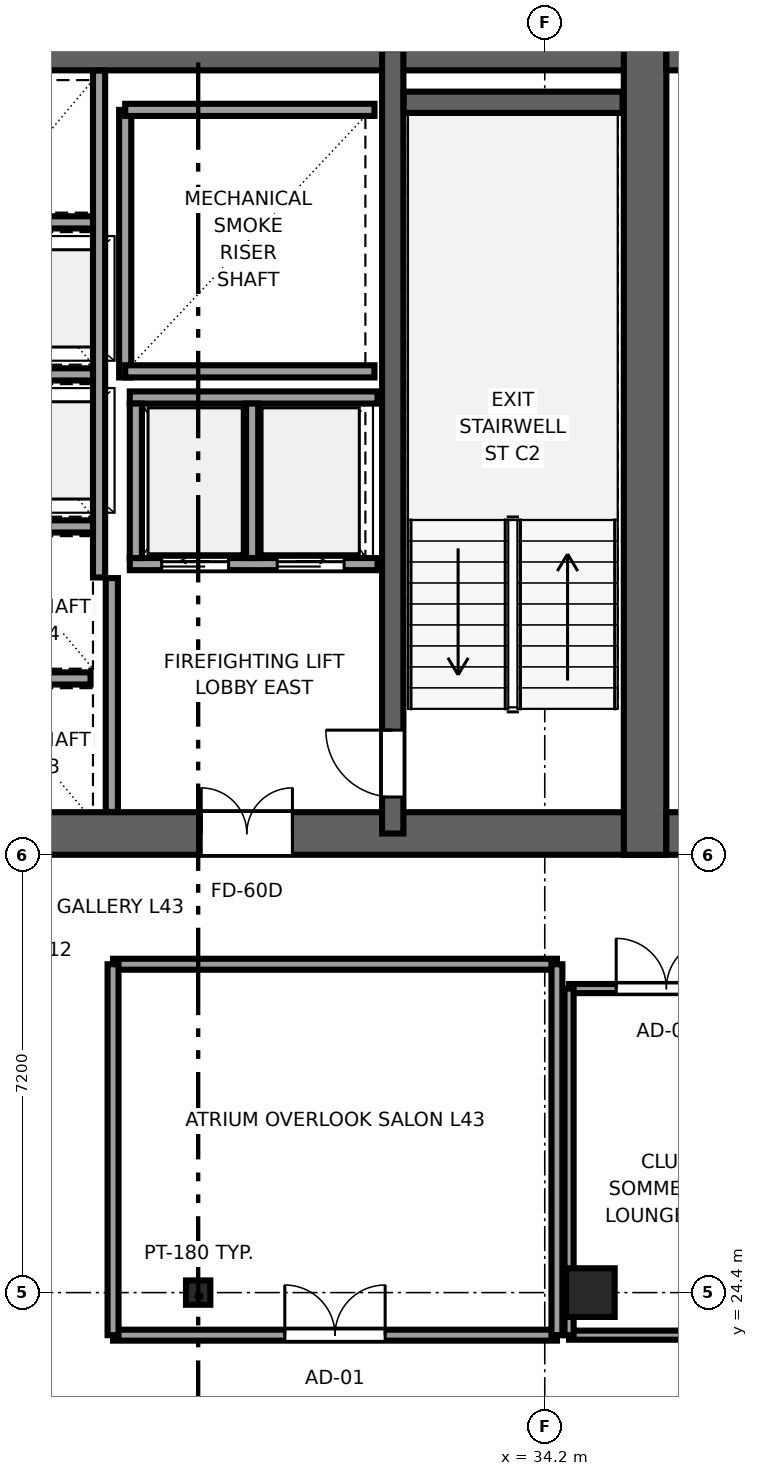
"""IFC4 building model, lengths in metres.
Left out: names, types, materials, properties, quantities, classifications, styles, units other than length and angle.
Written with IfcOpenShell. Run it as: python <this file> out.ifc"""

import sys

from ifc_helpers import new_model, si_unit, direction, frame, frame_2d, origin, origin_2d, place, context, subcontext, project, spatial, rectangle, i_section, extrude, source, transform, mapped, element, fill, save


model = new_model("IFC4")
c1 = context("Model", 3, precision=1e-05, world=origin(), true_north=direction((0.0, 1.0)))
c2 = subcontext(c1, "Body", "Model", "MODEL_VIEW")
j1 = project(units=[si_unit("LENGTHUNIT", "METRE"), si_unit("PLANEANGLEUNIT", "RADIAN")], contexts=[c1])
p1 = place(None, origin())
s1 = spatial("IfcSite", under=j1, at=p1, CompositionType="ELEMENT")
p2 = place(p1, origin())
s2 = spatial("IfcBuilding", under=s1, at=p2, CompositionType="ELEMENT")
p3 = place(p2, frame((0.0, 0.0, 164.8)))
s3 = spatial("IfcBuildingStorey", under=s2, at=p3, CompositionType="ELEMENT", Elevation=164.8)
p4 = place(p3, frame((9.8, 31.95, 0.0), z_axis=(0.0, 0.0, 1.0), x_axis=(1.0, 0.0, 0.0)))
e1 = element("IfcWall", 1, at=p4, inside=s3, PredefinedType="SHEAR", context=c2, shape_type="SweptSolid", body=[
    extrude(rectangle(XDim=26.4, YDim=0.7, at=frame_2d((13.2, 0.0))), origin(), (0.0, 0.0, 1.0), 3.55),
])
p5 = place(p4, frame((6.32, 0.0, 0.0), z_axis=(0.0, 0.0, 1.0), x_axis=(-1.0, 0.0, 0.0)))
e2 = element("IfcOpeningElement", 2, at=p5, cuts=e1, PredefinedType="OPENING", context=c2, shape_type="SweptSolid", body=[
    extrude(rectangle(XDim=1.5, YDim=2.04, at=frame_2d((0.75, 1.02))), frame((0.0, 0.36, 0.0), z_axis=(0.0, -1.0, 0.0), x_axis=(1.0, 0.0, 0.0)), (0.0, 0.0, 1.0), 0.72),
])
p6 = place(p4, frame((13.95, 0.0, 0.0), z_axis=(0.0, 0.0, 1.0), x_axis=(-1.0, 0.0, 0.0)))
e3 = element("IfcOpeningElement", 3, at=p6, cuts=e1, PredefinedType="OPENING", context=c2, shape_type="SweptSolid", body=[
    extrude(rectangle(XDim=1.5, YDim=2.04, at=frame_2d((0.75, 1.02))), frame((0.0, 0.36, 0.0), z_axis=(0.0, -1.0, 0.0), x_axis=(1.0, 0.0, 0.0)), (0.0, 0.0, 1.0), 0.72),
])
p7 = place(p4, frame((20.25, 0.0, 0.0), z_axis=(0.0, 0.0, 1.0), x_axis=(-1.0, 0.0, 0.0)))
e4 = element("IfcOpeningElement", 4, at=p7, cuts=e1, PredefinedType="OPENING", context=c2, shape_type="SweptSolid", body=[
    extrude(rectangle(XDim=1.5, YDim=2.04, at=frame_2d((0.75, 1.02))), frame((0.0, 0.36, 0.0), z_axis=(0.0, -1.0, 0.0), x_axis=(1.0, 0.0, 0.0)), (0.0, 0.0, 1.0), 0.72),
])
p8 = place(p4, frame((8.37, 0.0, 0.0), z_axis=(0.0, 0.0, 1.0), x_axis=(-1.0, 0.0, 0.0)))
e5 = element("IfcOpeningElement", 5, at=p8, cuts=e1, PredefinedType="OPENING", context=c2, shape_type="SweptSolid", body=[
    extrude(rectangle(XDim=0.82, YDim=2.01, at=frame_2d((0.41, 1.005))), frame((0.0, 0.36, 0.0), z_axis=(0.0, -1.0, 0.0), x_axis=(1.0, 0.0, 0.0)), (0.0, 0.0, 1.0), 0.72),
])
p9 = place(p3, frame((9.8, 44.85, 0.0), z_axis=(0.0, 0.0, 1.0), x_axis=(1.0, 0.0, 0.0)))
e6 = element("IfcWall", 6, at=p9, inside=s3, PredefinedType="SHEAR", context=c2, shape_type="SweptSolid", body=[
    extrude(rectangle(XDim=26.4, YDim=0.7, at=frame_2d((13.2, 0.0))), origin(), (0.0, 0.0, 1.0), 3.55),
])
p10 = place(p3, frame((35.85, 31.6, 0.0), z_axis=(0.0, 0.0, 1.0), x_axis=(0.0, 1.0, 0.0)))
e7 = element("IfcWall", 7, at=p10, inside=s3, PredefinedType="SHEAR", context=c2, shape_type="SweptSolid", body=[
    extrude(rectangle(XDim=13.6, YDim=0.7, at=frame_2d((6.8, 0.0))), origin(), (0.0, 0.0, 1.0), 3.55),
])
p11 = place(p3, frame((31.7, 31.95, 0.0), z_axis=(0.0, 0.0, 1.0), x_axis=(0.0, 1.0, 0.0)))
e8 = element("IfcWall", 8, at=p11, inside=s3, PredefinedType="SHEAR", context=c2, shape_type="SweptSolid", body=[
    extrude(rectangle(XDim=12.9, YDim=0.35, at=frame_2d((6.45, 0.0))), origin(), (0.0, 0.0, 1.0), 3.55),
])
p12 = place(p11, frame((1.7, 0.0, 0.0), z_axis=(0.0, 0.0, 1.0), x_axis=(-1.0, 0.0, 0.0)))
e9 = element("IfcOpeningElement", 9, at=p12, cuts=e8, PredefinedType="OPENING", context=c2, shape_type="SweptSolid", body=[
    extrude(rectangle(XDim=1.1, YDim=2.12, at=frame_2d((0.55, 1.06))), frame((0.0, 0.185, 0.0), z_axis=(0.0, -1.0, 0.0), x_axis=(1.0, 0.0, 0.0)), (0.0, 0.0, 1.0), 0.37),
])
p13 = place(p3, frame((36.2, 31.95, 0.0), z_axis=(0.0, 0.0, 1.0), x_axis=(1.0, 0.0, 0.0)))
e10 = element("IfcWall", 10, at=p13, inside=s3, PredefinedType="SHEAR", context=c2, shape_type="SweptSolid", body=[
    extrude(rectangle(XDim=4.2, YDim=0.7, at=frame_2d((2.1, 0.0))), origin(), (0.0, 0.0, 1.0), 3.55),
])
p14 = place(p13, frame((1.34, 0.0, 0.0), z_axis=(0.0, 0.0, 1.0), x_axis=(-1.0, 0.0, 0.0)))
e11 = element("IfcOpeningElement", 11, at=p14, cuts=e10, PredefinedType="OPENING", context=c2, shape_type="SweptSolid", body=[
    extrude(rectangle(XDim=1.02, YDim=2.03, at=frame_2d((0.51, 1.015))), frame((0.0, 0.36, 0.0), z_axis=(0.0, -1.0, 0.0), x_axis=(1.0, 0.0, 0.0)), (0.0, 0.0, 1.0), 0.72),
])
p15 = place(p3, frame((36.2, 44.85, 0.0), z_axis=(0.0, 0.0, 1.0), x_axis=(1.0, 0.0, 0.0)))
e12 = element("IfcWall", 12, at=p15, inside=s3, PredefinedType="SHEAR", context=c2, shape_type="SweptSolid", body=[
    extrude(rectangle(XDim=4.2, YDim=0.7, at=frame_2d((2.1, 0.0))), origin(), (0.0, 0.0, 1.0), 3.55),
])
p16 = place(p3, frame((31.88, 43.975, 0.0), z_axis=(0.0, 0.0, 1.0), x_axis=(1.0, 0.0, 0.0)))
e13 = element("IfcWall", 13, at=p16, inside=s3, PredefinedType="SHEAR", context=c2, shape_type="SweptSolid", body=[
    extrude(rectangle(XDim=3.6, YDim=0.35, at=frame_2d((1.8, 0.0))), origin(), (0.0, 0.0, 1.0), 3.55),
])
m1 = source(origin(), c2, "Body", "SweptSolid", [
    extrude(rectangle(XDim=0.8, YDim=0.8, at=origin_2d()), origin(), (0.0, 0.0, 1.0), 3.55),
])
p17 = place(p3, frame((34.95, 24.4, 0.0), z_axis=(0.0, 0.0, 1.0), x_axis=(1.0, 0.0, 0.0)))
e14 = element("IfcColumn", 14, at=p17, inside=s3, PredefinedType="COLUMN", context=c2, shape_type="MappedRepresentation", body=[
    mapped(m1, transform((0.0, 0.0, 0.0), x_axis=(1.0, 0.0, 0.0), y_axis=(0.0, 1.0, 0.0), z_axis=(0.0, 0.0, 1.0), scale=1.0)),
])
m2 = source(origin(), c2, "Body", "SweptSolid", [
    extrude(i_section(OverallWidth=0.4, OverallDepth=0.4, WebThickness=0.02, FlangeThickness=0.035, at=origin_2d()), origin(), (0.0, 0.0, 1.0), 3.55),
])
p18 = place(p3, frame((28.5, 24.4, 0.0), z_axis=(0.0, 0.0, 1.0), x_axis=(1.0, 0.0, 0.0)))
e15 = element("IfcColumn", 15, at=p18, inside=s3, PredefinedType="COLUMN", context=c2, shape_type="MappedRepresentation", body=[
    mapped(m2, transform((0.0, 0.0, 0.0), x_axis=(1.0, 0.0, 0.0), y_axis=(0.0, 1.0, 0.0), z_axis=(0.0, 0.0, 1.0), scale=1.0)),
])
p19 = place(p3, frame((27.3, 39.45, 0.0), z_axis=(0.0, 0.0, 1.0), x_axis=(0.0, 1.0, 0.0)))
e16 = element("IfcWall", 16, at=p19, inside=s3, PredefinedType="SOLIDWALL", context=c2, shape_type="SweptSolid", body=[
    extrude(rectangle(XDim=4.4, YDim=0.2, at=frame_2d((2.2, 0.0))), origin(), (0.0, 0.0, 1.0), 3.37),
])
for number, where, z_axis, x_axis in (
    (17, (27.3, 39.55, 0.0), (0.0, 0.0, 1.0), (1.0, 0.0, 0.0)),
    (18, (27.3, 43.85, 0.0), (0.0, 0.0, 1.0), (1.0, 0.0, 0.0)),
):
    element("IfcWall", number, at=place(p3, frame(where, z_axis=z_axis, x_axis=x_axis)), inside=s3, PredefinedType="SOLIDWALL", context=c2, shape_type="SweptSolid", body=[
        extrude(rectangle(XDim=4.1, YDim=0.2, at=frame_2d((2.05, 0.0))), origin(), (0.0, 0.0, 1.0), 3.37),
    ])
p20 = place(p3, frame((27.08, 32.304, 0.0), z_axis=(0.0, 0.0, 1.0), x_axis=(0.0, 1.0, 0.0)))
e19 = element("IfcWall", 19, at=p20, inside=s3, PredefinedType="SOLIDWALL", context=c2, shape_type="SweptSolid", body=[
    extrude(rectangle(XDim=3.846, YDim=0.2, at=frame_2d((1.923, 0.0))), origin(), (0.0, 0.0, 1.0), 3.37),
])
p21 = place(p3, frame((27.375, 36.38, 0.0), z_axis=(0.0, 0.0, 1.0), x_axis=(1.0, 0.0, 0.0)))
e20 = element("IfcWall", 20, at=p21, inside=s3, PredefinedType="SOLIDWALL", context=c2, shape_type="SweptSolid", body=[
    extrude(rectangle(XDim=4.075, YDim=0.2, at=frame_2d((2.038, 0.0))), origin(), (0.0, 0.0, 1.0), 3.37),
])
p22 = place(p21, frame((0.525, 0.0, 0.0)))
e21 = element("IfcOpeningElement", 21, at=p22, cuts=e20, PredefinedType="OPENING", context=c2, shape_type="SweptSolid", body=[
    extrude(rectangle(XDim=1.1, YDim=2.12, at=frame_2d((0.55, 1.06))), frame((0.0, 0.11, 0.0), z_axis=(0.0, -1.0, 0.0), x_axis=(1.0, 0.0, 0.0)), (0.0, 0.0, 1.0), 0.22),
])
p23 = place(p21, frame((2.425, 0.0, 0.0)))
e22 = element("IfcOpeningElement", 22, at=p23, cuts=e20, PredefinedType="OPENING", context=c2, shape_type="SweptSolid", body=[
    extrude(rectangle(XDim=1.1, YDim=2.12, at=frame_2d((0.55, 1.06))), frame((0.0, 0.11, 0.0), z_axis=(0.0, -1.0, 0.0), x_axis=(1.0, 0.0, 0.0)), (0.0, 0.0, 1.0), 0.22),
])
p24 = place(p3, frame((27.375, 39.12, 0.0), z_axis=(0.0, 0.0, 1.0), x_axis=(1.0, 0.0, 0.0)))
e23 = element("IfcWall", 23, at=p24, inside=s3, PredefinedType="SOLIDWALL", context=c2, shape_type="SweptSolid", body=[
    extrude(rectangle(XDim=4.075, YDim=0.2, at=frame_2d((2.038, 0.0))), origin(), (0.0, 0.0, 1.0), 3.37),
])
for number, where, z_axis, x_axis in (
    (24, (27.475, 36.48, 0.0), (0.0, 0.0, 1.0), (0.0, 1.0, 0.0)),
    (25, (29.387, 36.48, 0.0), (0.0, 0.0, 1.0), (0.0, 1.0, 0.0)),
):
    element("IfcWall", number, at=place(p3, frame(where, z_axis=z_axis, x_axis=x_axis)), inside=s3, PredefinedType="SOLIDWALL", context=c2, shape_type="SweptSolid", body=[
        extrude(rectangle(XDim=2.54, YDim=0.2, at=frame_2d((1.27, 0.0))), origin(), (0.0, 0.0, 1.0), 3.37),
    ])
p25 = place(p3, frame((26.87, 36.16, 0.0), z_axis=(0.0, 0.0, 1.0), x_axis=(0.0, 1.0, 0.0)))
e26 = element("IfcWall", 26, at=p25, inside=s3, PredefinedType="SOLIDWALL", context=c2, shape_type="SweptSolid", body=[
    extrude(rectangle(XDim=8.336, YDim=0.2, at=frame_2d((4.168, 0.0))), origin(), (0.0, 0.0, 1.0), 3.37),
])
p26 = place(p3, frame((24.93, 34.5, 0.0), z_axis=(0.0, 0.0, 1.0), x_axis=(1.0, 0.0, 0.0)))
e27 = element("IfcWall", 27, at=p26, inside=s3, PredefinedType="SOLIDWALL", context=c2, shape_type="SweptSolid", body=[
    extrude(rectangle(XDim=1.8, YDim=0.2, at=frame_2d((0.9, 0.0))), origin(), (0.0, 0.0, 1.0), 3.37),
])
for number, where, z_axis, x_axis in (
    (28, (24.93, 37.0, 0.0), (0.0, 0.0, 1.0), (1.0, 0.0, 0.0)),
    (29, (24.93, 39.5, 0.0), (0.0, 0.0, 1.0), (1.0, 0.0, 0.0)),
    (30, (24.93, 42.0, 0.0), (0.0, 0.0, 1.0), (1.0, 0.0, 0.0)),
):
    element("IfcWall", number, at=place(p3, frame(where, z_axis=z_axis, x_axis=x_axis)), inside=s3, PredefinedType="SOLIDWALL", context=c2, shape_type="SweptSolid", body=[
        extrude(rectangle(XDim=1.84, YDim=0.2, at=frame_2d((0.92, 0.0))), origin(), (0.0, 0.0, 1.0), 3.37),
    ])
p27 = place(p3, frame((27.1, 23.7, 0.0), z_axis=(0.0, 0.0, 1.0), x_axis=(1.0, 0.0, 0.0)))
e31 = element("IfcWall", 31, at=p27, inside=s3, PredefinedType="PARTITIONING", context=c2, shape_type="SweptSolid", body=[
    extrude(rectangle(XDim=7.3, YDim=0.18, at=frame_2d((3.65, 0.0))), origin(), (0.0, 0.0, 1.0), 3.37),
])
p28 = place(p27, frame((2.825, 0.0, 0.0)))
e32 = element("IfcOpeningElement", 32, at=p28, cuts=e31, PredefinedType="OPENING", context=c2, shape_type="SweptSolid", body=[
    extrude(rectangle(XDim=1.65, YDim=2.15, at=frame_2d((0.825, 1.075))), frame((0.0, 0.1, 0.0), z_axis=(0.0, -1.0, 0.0), x_axis=(1.0, 0.0, 0.0)), (0.0, 0.0, 1.0), 0.2),
])
p29 = place(p3, frame((27.1, 29.8, 0.0), z_axis=(0.0, 0.0, 1.0), x_axis=(1.0, 0.0, 0.0)))
e33 = element("IfcWall", 33, at=p29, inside=s3, PredefinedType="PARTITIONING", context=c2, shape_type="SweptSolid", body=[
    extrude(rectangle(XDim=7.3, YDim=0.18, at=frame_2d((3.65, 0.0))), origin(), (0.0, 0.0, 1.0), 3.37),
])
for number, where, z_axis, x_axis in (
    (34, (27.1, 23.7, 0.0), (0.0, 0.0, 1.0), (0.0, 1.0, 0.0)),
    (35, (34.4, 23.7, 0.0), (0.0, 0.0, 1.0), (0.0, 1.0, 0.0)),
):
    element("IfcWall", number, at=place(p3, frame(where, z_axis=z_axis, x_axis=x_axis)), inside=s3, PredefinedType="PARTITIONING", context=c2, shape_type="SweptSolid", body=[
        extrude(rectangle(XDim=6.1, YDim=0.18, at=frame_2d((3.05, 0.0))), origin(), (0.0, 0.0, 1.0), 3.37),
    ])
p30 = place(p3, frame((34.6, 23.7, 0.0), z_axis=(0.0, 0.0, 1.0), x_axis=(1.0, 0.0, 0.0)))
e36 = element("IfcWall", 36, at=p30, inside=s3, PredefinedType="PARTITIONING", context=c2, shape_type="SweptSolid", body=[
    extrude(rectangle(XDim=3.2, YDim=0.15, at=frame_2d((1.6, 0.0))), origin(), (0.0, 0.0, 1.0), 3.37),
])
p31 = place(p3, frame((34.6, 29.4, 0.0), z_axis=(0.0, 0.0, 1.0), x_axis=(1.0, 0.0, 0.0)))
e37 = element("IfcWall", 37, at=p31, inside=s3, PredefinedType="PARTITIONING", context=c2, shape_type="SweptSolid", body=[
    extrude(rectangle(XDim=3.2, YDim=0.15, at=frame_2d((1.6, 0.0))), origin(), (0.0, 0.0, 1.0), 3.37),
])
p32 = place(p31, frame((0.775, 0.0, 0.0)))
e38 = element("IfcOpeningElement", 38, at=p32, cuts=e37, PredefinedType="OPENING", context=c2, shape_type="SweptSolid", body=[
    extrude(rectangle(XDim=1.65, YDim=2.15, at=frame_2d((0.825, 1.075))), frame((0.0, 0.085, 0.0), z_axis=(0.0, -1.0, 0.0), x_axis=(1.0, 0.0, 0.0)), (0.0, 0.0, 1.0), 0.17),
])
p33 = place(p3, frame((34.6, 23.7, 0.0), z_axis=(0.0, 0.0, 1.0), x_axis=(0.0, 1.0, 0.0)))
e39 = element("IfcWall", 39, at=p33, inside=s3, PredefinedType="PARTITIONING", context=c2, shape_type="SweptSolid", body=[
    extrude(rectangle(XDim=5.7, YDim=0.15, at=frame_2d((2.85, 0.0))), origin(), (0.0, 0.0, 1.0), 3.37),
])
m3 = source(origin(), c2, "Body", "SweptSolid", [
    extrude(rectangle(XDim=1.1, YDim=2.12, at=frame_2d((0.55, 1.06))), frame((0.0, 0.025, 0.0), z_axis=(0.0, -1.0, 0.0), x_axis=(1.0, 0.0, 0.0)), (0.0, 0.0, 1.0), 0.05),
])
p34 = place(p12, origin())
e40 = element("IfcDoor", 40, at=p34, inside=s3, OperationType="SINGLE_SWING_RIGHT", PredefinedType="DOOR", context=c2, shape_type="MappedRepresentation", body=[
    mapped(m3, transform((0.0, 0.0, 0.0), x_axis=(1.0, 0.0, 0.0), y_axis=(0.0, 1.0, 0.0), z_axis=(0.0, 0.0, 1.0), scale=1.0)),
])
fill(e9, e40)
m4 = source(origin(), c2, "Body", "SweptSolid", [
    extrude(rectangle(XDim=1.5, YDim=2.04, at=frame_2d((0.75, 1.02))), frame((0.0, 0.025, 0.0), z_axis=(0.0, -1.0, 0.0), x_axis=(1.0, 0.0, 0.0)), (0.0, 0.0, 1.0), 0.05),
])
p35 = place(p7, origin())
e41 = element("IfcDoor", 41, at=p35, inside=s3, OperationType="DOUBLE_DOOR_SINGLE_SWING", PredefinedType="DOOR", context=c2, shape_type="MappedRepresentation", body=[
    mapped(m4, transform((0.0, 0.0, 0.0), x_axis=(1.0, 0.0, 0.0), y_axis=(0.0, 1.0, 0.0), z_axis=(0.0, 0.0, 1.0), scale=1.0)),
])
fill(e4, e41)
m5 = source(origin(), c2, "Body", "SweptSolid", [
    extrude(rectangle(XDim=1.1, YDim=2.12, at=frame_2d((0.55, 1.06))), frame((0.0, 0.025, 0.0), z_axis=(0.0, -1.0, 0.0), x_axis=(1.0, 0.0, 0.0)), (0.0, 0.0, 1.0), 0.05),
])
p36 = place(p22, origin())
e42 = element("IfcDoor", 42, at=p36, inside=s3, OperationType="SLIDING_TO_LEFT", PredefinedType="DOOR", context=c2, shape_type="MappedRepresentation", body=[
    mapped(m5, transform((0.0, 0.0, 0.0), x_axis=(1.0, 0.0, 0.0), y_axis=(0.0, 1.0, 0.0), z_axis=(0.0, 0.0, 1.0), scale=1.0)),
])
fill(e21, e42)
p37 = place(p23, origin())
e43 = element("IfcDoor", 43, at=p37, inside=s3, OperationType="SLIDING_TO_RIGHT", PredefinedType="DOOR", context=c2, shape_type="MappedRepresentation", body=[
    mapped(m5, transform((0.0, 0.0, 0.0), x_axis=(1.0, 0.0, 0.0), y_axis=(0.0, 1.0, 0.0), z_axis=(0.0, 0.0, 1.0), scale=1.0)),
])
fill(e22, e43)
m6 = source(origin(), c2, "Body", "SweptSolid", [
    extrude(rectangle(XDim=1.65, YDim=2.15, at=frame_2d((0.825, 1.075))), frame((0.0, 0.025, 0.0), z_axis=(0.0, -1.0, 0.0), x_axis=(1.0, 0.0, 0.0)), (0.0, 0.0, 1.0), 0.05),
])
p38 = place(p28, origin())
e44 = element("IfcDoor", 44, at=p38, inside=s3, OperationType="DOUBLE_DOOR_SINGLE_SWING", PredefinedType="DOOR", context=c2, shape_type="MappedRepresentation", body=[
    mapped(m6, transform((0.0, 0.0, 0.0), x_axis=(1.0, 0.0, 0.0), y_axis=(0.0, 1.0, 0.0), z_axis=(0.0, 0.0, 1.0), scale=1.0)),
])
fill(e32, e44)
p39 = place(p32, origin())
e45 = element("IfcDoor", 45, at=p39, inside=s3, OperationType="DOUBLE_DOOR_SINGLE_SWING", PredefinedType="DOOR", context=c2, shape_type="MappedRepresentation", body=[
    mapped(m6, transform((0.0, 0.0, 0.0), x_axis=(1.0, 0.0, 0.0), y_axis=(0.0, 1.0, 0.0), z_axis=(0.0, 0.0, 1.0), scale=1.0)),
])
fill(e38, e45)
save(model, sys.argv[1])
